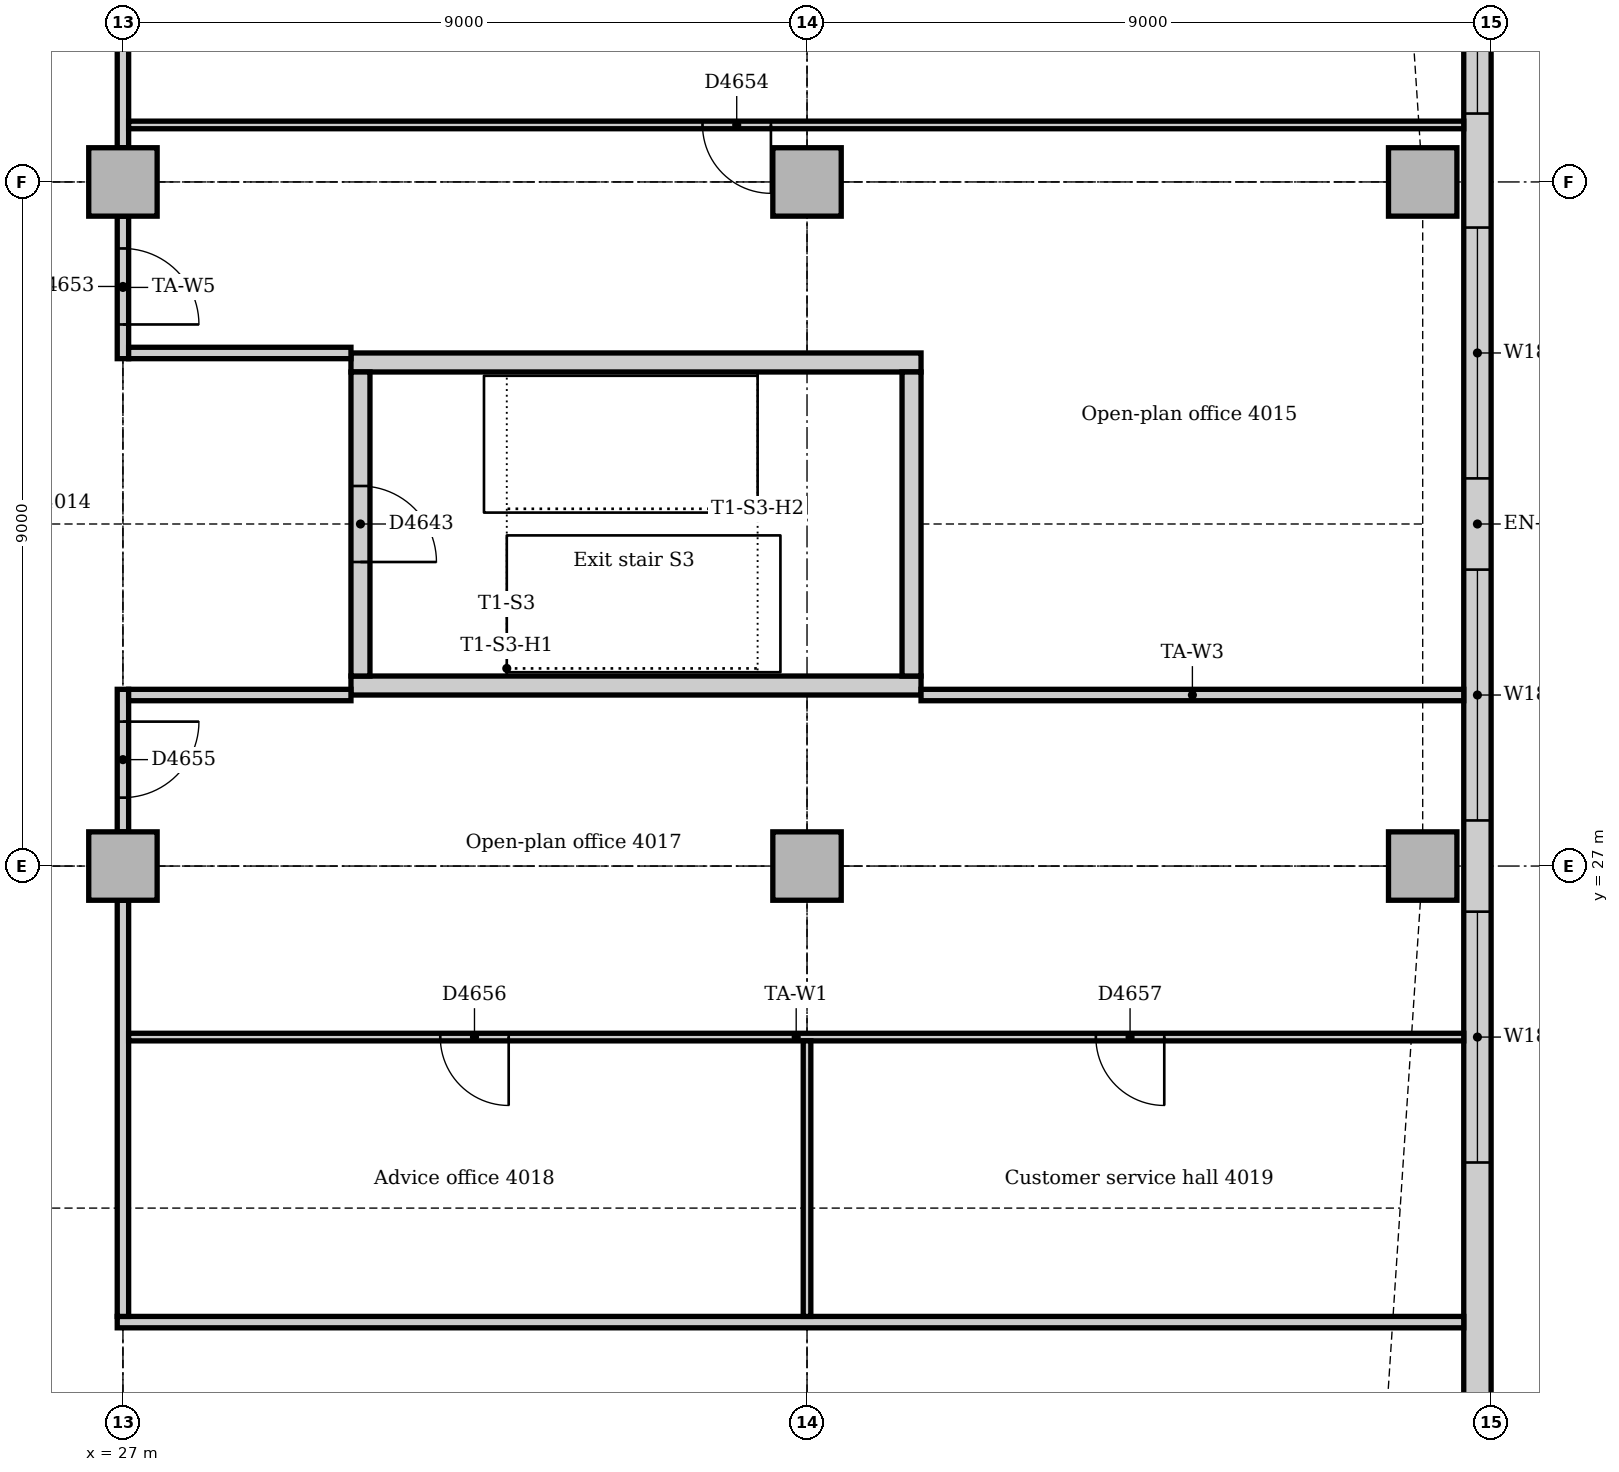
"""IFC4 building model, lengths in metres.
Left out: names, types, materials, properties, quantities, classifications, styles, units other than length and angle.
Written with IfcOpenShell. Run it as: python <this file> out.ifc"""

import sys

from ifc_helpers import new_model, si_unit, direction, frame, frame_2d, origin, origin_2d, place, context, subcontext, project, spatial, rectangle, extrude, element, fill, save


model = new_model("IFC4")
c1 = context("Model", 3, precision=1e-05, world=origin(), true_north=direction((0.0, 1.0)))
c2 = subcontext(c1, "Body", "Model", "MODEL_VIEW")
j1 = project(units=[si_unit("LENGTHUNIT", "METRE"), si_unit("PLANEANGLEUNIT", "RADIAN")], contexts=[c1])
p1 = place(None, origin())
s1 = spatial("IfcSite", under=j1, at=p1, CompositionType="ELEMENT")
p2 = place(p1, origin())
s2 = spatial("IfcBuilding", under=s1, at=p2, CompositionType="ELEMENT")
p3 = place(p2, frame((0.0, 0.0, 169.0)))
s3 = spatial("IfcBuildingStorey", under=s2, at=p3, CompositionType="ELEMENT", Elevation=169.0)
for number, where, z_axis, x_axis in (
    (1, (30.0, 29.375, 0.0), (0.0, 0.0, 1.0), (1.0, 0.0, 0.0)),
    (2, (37.5, 33.625, 0.0), (0.0, 0.0, 1.0), (-1.0, 0.0, 0.0)),
):
    element("IfcWall", number, at=place(p3, frame(where, z_axis=z_axis, x_axis=x_axis)), inside=s3, PredefinedType="SOLIDWALL", context=c2, shape_type="SweptSolid", body=[
        extrude(rectangle(XDim=7.5, YDim=0.25, at=frame_2d((3.75, 0.0))), origin(), (0.0, 0.0, 1.0), 4.0),
    ])
p4 = place(p3, frame((37.375, 29.5, 0.0), z_axis=(0.0, 0.0, 1.0), x_axis=(0.0, 1.0, 0.0)))
e3 = element("IfcWall", 3, at=p4, inside=s3, PredefinedType="SOLIDWALL", context=c2, shape_type="SweptSolid", body=[
    extrude(rectangle(XDim=4.0, YDim=0.25, at=frame_2d((2.0, 0.0))), origin(), (0.0, 0.0, 1.0), 4.0),
])
p5 = place(p3, frame((30.125, 33.5, 0.0), z_axis=(0.0, 0.0, 1.0), x_axis=(0.0, -1.0, 0.0)))
e4 = element("IfcWall", 4, at=p5, inside=s3, PredefinedType="SOLIDWALL", context=c2, shape_type="SweptSolid", body=[
    extrude(rectangle(XDim=4.0, YDim=0.25, at=frame_2d((2.0, 0.0))), origin(), (0.0, 0.0, 1.0), 4.0),
])
p6 = place(p5, frame((1.5, 0.0, 0.0)))
e5 = element("IfcOpeningElement", 5, at=p6, cuts=e4, PredefinedType="OPENING", context=c2, shape_type="SweptSolid", body=[
    extrude(rectangle(XDim=1.0, YDim=2.1, at=frame_2d((0.5, 1.05))), frame((0.0, 0.135, 0.0), z_axis=(0.0, -1.0, 0.0), x_axis=(1.0, 0.0, 0.0)), (0.0, 0.0, 1.0), 0.27),
])
for number, where, z_axis, x_axis in (
    (6, (44.1, 27.0, 0.0), (0.0, 0.0, 1.0), (1.0, 0.0, 0.0)),
    (7, (44.1, 36.0, 0.0), (0.0, 0.0, 1.0), (1.0, 0.0, 0.0)),
    (8, (27.0, 27.0, 0.0), (0.0, 0.0, 1.0), (1.0, 0.0, 0.0)),
    (9, (27.0, 36.0, 0.0), (0.0, 0.0, 1.0), (1.0, 0.0, 0.0)),
    (10, (36.0, 27.0, 0.0), (0.0, 0.0, 1.0), (1.0, 0.0, 0.0)),
    (11, (36.0, 36.0, 0.0), (0.0, 0.0, 1.0), (1.0, 0.0, 0.0)),
):
    element("IfcColumn", number, at=place(p3, frame(where, z_axis=z_axis, x_axis=x_axis)), inside=s3, PredefinedType="COLUMN", context=c2, shape_type="SweptSolid", body=[
        extrude(rectangle(XDim=0.9, YDim=0.9, at=origin_2d()), origin(), (0.0, 0.0, 1.0), 3.85),
    ])
p7 = place(p3, frame((44.82, 19.243, 0.0), z_axis=(0.0, 0.0, 1.0), x_axis=(0.0, 1.0, 0.0)))
e12 = element("IfcWall", 12, at=p7, inside=s3, PredefinedType="STANDARD", context=c2, shape_type="SweptSolid", body=[
    extrude(rectangle(XDim=24.515, YDim=0.36, at=frame_2d((12.257, 0.0))), origin(), (0.0, 0.0, 1.0), 3.85),
])
p8 = place(p7, frame((3.857, 0.0, 0.9)))
e13 = element("IfcOpeningElement", 13, at=p8, cuts=e12, PredefinedType="OPENING", context=c2, shape_type="SweptSolid", body=[
    extrude(rectangle(XDim=3.3, YDim=1.6, at=frame_2d((1.65, 0.8))), frame((0.0, 0.19, 0.0), z_axis=(0.0, -1.0, 0.0), x_axis=(1.0, 0.0, 0.0)), (0.0, 0.0, 1.0), 0.38),
])
p9 = place(p7, frame((8.357, 0.0, 0.9)))
e14 = element("IfcOpeningElement", 14, at=p9, cuts=e12, PredefinedType="OPENING", context=c2, shape_type="SweptSolid", body=[
    extrude(rectangle(XDim=3.3, YDim=1.6, at=frame_2d((1.65, 0.8))), frame((0.0, 0.19, 0.0), z_axis=(0.0, -1.0, 0.0), x_axis=(1.0, 0.0, 0.0)), (0.0, 0.0, 1.0), 0.38),
])
p10 = place(p7, frame((12.857, 0.0, 0.9)))
e15 = element("IfcOpeningElement", 15, at=p10, cuts=e12, PredefinedType="OPENING", context=c2, shape_type="SweptSolid", body=[
    extrude(rectangle(XDim=3.3, YDim=1.6, at=frame_2d((1.65, 0.8))), frame((0.0, 0.19, 0.0), z_axis=(0.0, -1.0, 0.0), x_axis=(1.0, 0.0, 0.0)), (0.0, 0.0, 1.0), 0.38),
])
p11 = place(p7, frame((17.657, 0.0, 0.9)))
e16 = element("IfcOpeningElement", 16, at=p11, cuts=e12, PredefinedType="OPENING", context=c2, shape_type="SweptSolid", body=[
    extrude(rectangle(XDim=3.3, YDim=1.6, at=frame_2d((1.65, 0.8))), frame((0.0, 0.19, 0.0), z_axis=(0.0, -1.0, 0.0), x_axis=(1.0, 0.0, 0.0)), (0.0, 0.0, 1.0), 0.38),
])
p12 = place(p3, frame((26.925, 21.0, 0.0), z_axis=(0.0, 0.0, 1.0), x_axis=(1.0, 0.0, 0.0)))
e17 = element("IfcWall", 17, at=p12, inside=s3, PredefinedType="PARTITIONING", context=c2, shape_type="SweptSolid", body=[
    extrude(rectangle(XDim=17.715, YDim=0.15, at=frame_2d((8.857, 0.0))), origin(), (0.0, 0.0, 1.0), 3.85),
])
p13 = place(p3, frame((27.0, 33.675, 0.0), z_axis=(0.0, 0.0, 1.0), x_axis=(0.0, 1.0, 0.0)))
e18 = element("IfcWall", 18, at=p13, inside=s3, PredefinedType="PARTITIONING", context=c2, shape_type="SweptSolid", body=[
    extrude(rectangle(XDim=1.875, YDim=0.15, at=frame_2d((0.938, 0.0))), origin(), (0.0, 0.0, 1.0), 3.362),
])
p14 = place(p13, frame((0.45, 0.0, 0.0)))
e19 = element("IfcOpeningElement", 19, at=p14, cuts=e18, PredefinedType="OPENING", context=c2, shape_type="SweptSolid", body=[
    extrude(rectangle(XDim=1.0, YDim=2.1, at=frame_2d((0.5, 1.05))), frame((0.0, 0.085, 0.0), z_axis=(0.0, -1.0, 0.0), x_axis=(1.0, 0.0, 0.0)), (0.0, 0.0, 1.0), 0.17),
])
p15 = place(p3, frame((27.0, 36.45, 0.0), z_axis=(0.0, 0.0, 1.0), x_axis=(0.0, 1.0, 0.0)))
e20 = element("IfcWall", 20, at=p15, inside=s3, PredefinedType="PARTITIONING", context=c2, shape_type="SweptSolid", body=[
    extrude(rectangle(XDim=7.2, YDim=0.15, at=frame_2d((3.6, 0.0))), origin(), (0.0, 0.0, 1.0), 3.362),
])
p16 = place(p3, frame((27.0, 21.075, 0.0), z_axis=(0.0, 0.0, 1.0), x_axis=(0.0, 1.0, 0.0)))
e21 = element("IfcWall", 21, at=p16, inside=s3, PredefinedType="PARTITIONING", context=c2, shape_type="SweptSolid", body=[
    extrude(rectangle(XDim=5.475, YDim=0.15, at=frame_2d((2.737, 0.0))), origin(), (0.0, 0.0, 1.0), 3.362),
])
p17 = place(p3, frame((27.0, 27.45, 0.0), z_axis=(0.0, 0.0, 1.0), x_axis=(0.0, 1.0, 0.0)))
e22 = element("IfcWall", 22, at=p17, inside=s3, PredefinedType="PARTITIONING", context=c2, shape_type="SweptSolid", body=[
    extrude(rectangle(XDim=1.875, YDim=0.15, at=frame_2d((0.938, 0.0))), origin(), (0.0, 0.0, 1.0), 3.362),
])
p18 = place(p17, frame((0.45, 0.0, 0.0)))
e23 = element("IfcOpeningElement", 23, at=p18, cuts=e22, PredefinedType="OPENING", context=c2, shape_type="SweptSolid", body=[
    extrude(rectangle(XDim=1.0, YDim=2.1, at=frame_2d((0.5, 1.05))), frame((0.0, 0.085, 0.0), z_axis=(0.0, -1.0, 0.0), x_axis=(1.0, 0.0, 0.0)), (0.0, 0.0, 1.0), 0.17),
])
for number, where, z_axis, x_axis in (
    (24, (27.075, 29.25, 0.0), (0.0, 0.0, 1.0), (1.0, 0.0, 0.0)),
    (25, (27.075, 33.75, 0.0), (0.0, 0.0, 1.0), (1.0, 0.0, 0.0)),
):
    element("IfcWall", number, at=place(p3, frame(where, z_axis=z_axis, x_axis=x_axis)), inside=s3, PredefinedType="PARTITIONING", context=c2, shape_type="SweptSolid", body=[
        extrude(rectangle(XDim=2.925, YDim=0.15, at=frame_2d((1.462, 0.0))), origin(), (0.0, 0.0, 1.0), 3.85),
    ])
p19 = place(p3, frame((37.5, 29.25, 0.0), z_axis=(0.0, 0.0, 1.0), x_axis=(1.0, 0.0, 0.0)))
e26 = element("IfcWall", 26, at=p19, inside=s3, PredefinedType="PARTITIONING", context=c2, shape_type="SweptSolid", body=[
    extrude(rectangle(XDim=7.14, YDim=0.15, at=frame_2d((3.57, 0.0))), origin(), (0.0, 0.0, 1.0), 3.85),
])
p20 = place(p3, frame((27.075, 24.75, 0.0), z_axis=(0.0, 0.0, 1.0), x_axis=(1.0, 0.0, 0.0)))
e27 = element("IfcWall", 27, at=p20, inside=s3, PredefinedType="PARTITIONING", context=c2, shape_type="SweptSolid", body=[
    extrude(rectangle(XDim=17.565, YDim=0.1, at=frame_2d((8.783, 0.0))), origin(), (0.0, 0.0, 1.0), 3.85),
])
p21 = place(p20, frame((4.1, 0.0, 0.0)))
e28 = element("IfcOpeningElement", 28, at=p21, cuts=e27, PredefinedType="OPENING", context=c2, shape_type="SweptSolid", body=[
    extrude(rectangle(XDim=0.9, YDim=2.1, at=frame_2d((0.45, 1.05))), frame((0.0, 0.06, 0.0), z_axis=(0.0, -1.0, 0.0), x_axis=(1.0, 0.0, 0.0)), (0.0, 0.0, 1.0), 0.12),
])
p22 = place(p20, frame((12.725, 0.0, 0.0)))
e29 = element("IfcOpeningElement", 29, at=p22, cuts=e27, PredefinedType="OPENING", context=c2, shape_type="SweptSolid", body=[
    extrude(rectangle(XDim=0.9, YDim=2.1, at=frame_2d((0.45, 1.05))), frame((0.0, 0.06, 0.0), z_axis=(0.0, -1.0, 0.0), x_axis=(1.0, 0.0, 0.0)), (0.0, 0.0, 1.0), 0.12),
])
p23 = place(p3, frame((27.075, 36.75, 0.0), z_axis=(0.0, 0.0, 1.0), x_axis=(1.0, 0.0, 0.0)))
e30 = element("IfcWall", 30, at=p23, inside=s3, PredefinedType="PARTITIONING", context=c2, shape_type="SweptSolid", body=[
    extrude(rectangle(XDim=17.565, YDim=0.1, at=frame_2d((8.783, 0.0))), origin(), (0.0, 0.0, 1.0), 3.85),
])
p24 = place(p23, frame((7.55, 0.0, 0.0)))
e31 = element("IfcOpeningElement", 31, at=p24, cuts=e30, PredefinedType="OPENING", context=c2, shape_type="SweptSolid", body=[
    extrude(rectangle(XDim=0.9, YDim=2.1, at=frame_2d((0.45, 1.05))), frame((0.0, 0.06, 0.0), z_axis=(0.0, -1.0, 0.0), x_axis=(1.0, 0.0, 0.0)), (0.0, 0.0, 1.0), 0.12),
])
p25 = place(p3, frame((36.0, 21.075, 0.0), z_axis=(0.0, 0.0, 1.0), x_axis=(0.0, 1.0, 0.0)))
e32 = element("IfcWall", 32, at=p25, inside=s3, PredefinedType="PARTITIONING", context=c2, shape_type="SweptSolid", body=[
    extrude(rectangle(XDim=3.625, YDim=0.1, at=frame_2d((1.812, 0.0))), origin(), (0.0, 0.0, 1.0), 3.362),
])
p26 = place(p8, origin())
e33 = element("IfcWindow", 33, at=p26, inside=s3, PartitioningType="SINGLE_PANEL", PredefinedType="WINDOW", context=c2, shape_type="SweptSolid", body=[
    extrude(rectangle(XDim=3.3, YDim=1.6, at=frame_2d((1.65, 0.8))), frame((0.0, 0.13, 0.0), z_axis=(0.0, -1.0, 0.0), x_axis=(1.0, 0.0, 0.0)), (0.0, 0.0, 1.0), 0.06),
])
fill(e13, e33)
p27 = place(p9, origin())
e34 = element("IfcWindow", 34, at=p27, inside=s3, PartitioningType="SINGLE_PANEL", PredefinedType="WINDOW", context=c2, shape_type="SweptSolid", body=[
    extrude(rectangle(XDim=3.3, YDim=1.6, at=frame_2d((1.65, 0.8))), frame((0.0, 0.13, 0.0), z_axis=(0.0, -1.0, 0.0), x_axis=(1.0, 0.0, 0.0)), (0.0, 0.0, 1.0), 0.06),
])
fill(e14, e34)
p28 = place(p10, origin())
e35 = element("IfcWindow", 35, at=p28, inside=s3, PartitioningType="SINGLE_PANEL", PredefinedType="WINDOW", context=c2, shape_type="SweptSolid", body=[
    extrude(rectangle(XDim=3.3, YDim=1.6, at=frame_2d((1.65, 0.8))), frame((0.0, 0.13, 0.0), z_axis=(0.0, -1.0, 0.0), x_axis=(1.0, 0.0, 0.0)), (0.0, 0.0, 1.0), 0.06),
])
fill(e15, e35)
p29 = place(p11, origin())
e36 = element("IfcWindow", 36, at=p29, inside=s3, PartitioningType="SINGLE_PANEL", PredefinedType="WINDOW", context=c2, shape_type="SweptSolid", body=[
    extrude(rectangle(XDim=3.3, YDim=1.6, at=frame_2d((1.65, 0.8))), frame((0.0, 0.13, 0.0), z_axis=(0.0, -1.0, 0.0), x_axis=(1.0, 0.0, 0.0)), (0.0, 0.0, 1.0), 0.06),
])
fill(e16, e36)
p30 = place(p6, origin())
e37 = element("IfcDoor", 37, at=p30, inside=s3, OperationType="SINGLE_SWING_RIGHT", PredefinedType="DOOR", context=c2, shape_type="SweptSolid", body=[
    extrude(rectangle(XDim=1.0, YDim=2.1, at=frame_2d((0.5, 1.05))), frame((0.0, 0.025, 0.0), z_axis=(0.0, -1.0, 0.0), x_axis=(1.0, 0.0, 0.0)), (0.0, 0.0, 1.0), 0.05),
])
fill(e5, e37)
p31 = place(p14, frame((1.0, 0.0, 0.0), z_axis=(0.0, 0.0, 1.0), x_axis=(-1.0, 0.0, 0.0)))
e38 = element("IfcDoor", 38, at=p31, inside=s3, OperationType="SINGLE_SWING_RIGHT", PredefinedType="DOOR", context=c2, shape_type="SweptSolid", body=[
    extrude(rectangle(XDim=1.0, YDim=2.1, at=frame_2d((0.5, 1.05))), frame((0.0, 0.025, 0.0), z_axis=(0.0, -1.0, 0.0), x_axis=(1.0, 0.0, 0.0)), (0.0, 0.0, 1.0), 0.05),
])
fill(e19, e38)
p32 = place(p24, frame((0.9, 0.0, 0.0), z_axis=(0.0, 0.0, 1.0), x_axis=(-1.0, 0.0, 0.0)))
e39 = element("IfcDoor", 39, at=p32, inside=s3, OperationType="SINGLE_SWING_LEFT", PredefinedType="DOOR", context=c2, shape_type="SweptSolid", body=[
    extrude(rectangle(XDim=0.9, YDim=2.1, at=frame_2d((0.45, 1.05))), frame((0.0, 0.025, 0.0), z_axis=(0.0, -1.0, 0.0), x_axis=(1.0, 0.0, 0.0)), (0.0, 0.0, 1.0), 0.05),
])
fill(e31, e39)
p33 = place(p18, frame((1.0, 0.0, 0.0), z_axis=(0.0, 0.0, 1.0), x_axis=(-1.0, 0.0, 0.0)))
e40 = element("IfcDoor", 40, at=p33, inside=s3, OperationType="SINGLE_SWING_LEFT", PredefinedType="DOOR", context=c2, shape_type="SweptSolid", body=[
    extrude(rectangle(XDim=1.0, YDim=2.1, at=frame_2d((0.5, 1.05))), frame((0.0, 0.025, 0.0), z_axis=(0.0, -1.0, 0.0), x_axis=(1.0, 0.0, 0.0)), (0.0, 0.0, 1.0), 0.05),
])
fill(e23, e40)
p34 = place(p21, frame((0.9, 0.0, 0.0), z_axis=(0.0, 0.0, 1.0), x_axis=(-1.0, 0.0, 0.0)))
e41 = element("IfcDoor", 41, at=p34, inside=s3, OperationType="SINGLE_SWING_LEFT", PredefinedType="DOOR", context=c2, shape_type="SweptSolid", body=[
    extrude(rectangle(XDim=0.9, YDim=2.1, at=frame_2d((0.45, 1.05))), frame((0.0, 0.025, 0.0), z_axis=(0.0, -1.0, 0.0), x_axis=(1.0, 0.0, 0.0)), (0.0, 0.0, 1.0), 0.05),
])
fill(e28, e41)
p35 = place(p22, frame((0.9, 0.0, 0.0), z_axis=(0.0, 0.0, 1.0), x_axis=(-1.0, 0.0, 0.0)))
e42 = element("IfcDoor", 42, at=p35, inside=s3, OperationType="SINGLE_SWING_LEFT", PredefinedType="DOOR", context=c2, shape_type="SweptSolid", body=[
    extrude(rectangle(XDim=0.9, YDim=2.1, at=frame_2d((0.45, 1.05))), frame((0.0, 0.025, 0.0), z_axis=(0.0, -1.0, 0.0), x_axis=(1.0, 0.0, 0.0)), (0.0, 0.0, 1.0), 0.05),
])
fill(e29, e42)
save(model, sys.argv[1])
